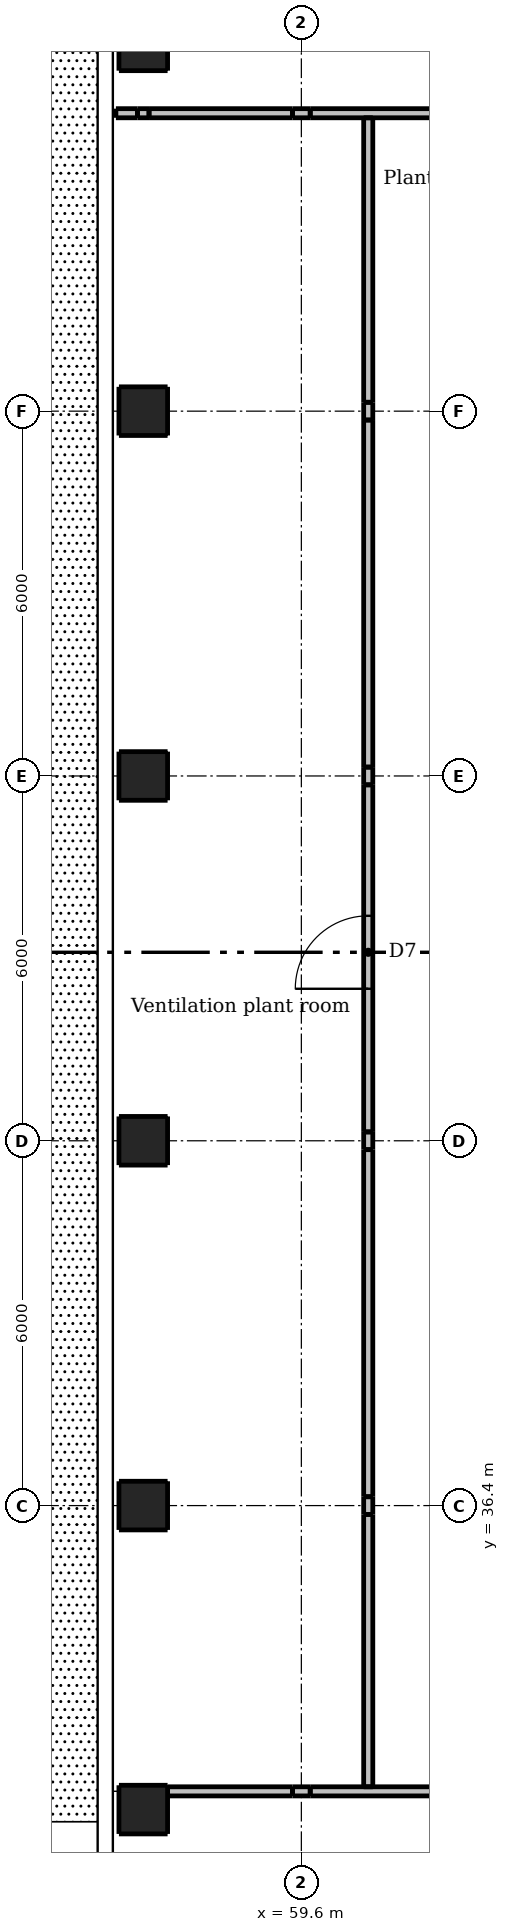
"""IFC4 building model, lengths in metres.
Left out: names, types, materials, properties, quantities, classifications, styles, units other than length and angle.
Written with IfcOpenShell. Run it as: python <this file> out.ifc"""

import sys

from ifc_helpers import new_model, si_unit, direction, frame, frame_2d, origin, origin_2d, place, context, subcontext, project, spatial, rectangle, extrude, element, fill, save


model = new_model("IFC4")
c1 = context("Model", 3, precision=1e-05, world=origin(), true_north=direction((0.0, 1.0)))
c2 = subcontext(c1, "Body", "Model", "MODEL_VIEW")
j1 = project(units=[si_unit("LENGTHUNIT", "METRE"), si_unit("PLANEANGLEUNIT", "RADIAN")], contexts=[c1])
p1 = place(None, origin())
s1 = spatial("IfcSite", under=j1, at=p1, CompositionType="ELEMENT")
p2 = place(p1, origin())
s2 = spatial("IfcBuilding", under=s1, at=p2, CompositionType="ELEMENT")
p3 = place(p2, frame((0.0, 0.0, 290.8)))
s3 = spatial("IfcBuildingStorey", under=s2, at=p3, CompositionType="ELEMENT", Elevation=290.8)
for number, where, z_axis, x_axis in (
    (1, (57.0, 31.4, 0.0), (0.0, 0.0, 1.0), (1.0, 0.0, 0.0)),
    (2, (57.0, 36.4, 0.0), (0.0, 0.0, 1.0), (1.0, 0.0, 0.0)),
    (3, (57.0, 42.4, 0.0), (0.0, 0.0, 1.0), (1.0, 0.0, 0.0)),
    (4, (57.0, 48.4, 0.0), (0.0, 0.0, 1.0), (1.0, 0.0, 0.0)),
    (5, (57.0, 54.4, 0.0), (0.0, 0.0, 1.0), (1.0, 0.0, 0.0)),
    (6, (57.0, 60.4, 0.0), (0.0, 0.0, 1.0), (1.0, 0.0, 0.0)),
):
    element("IfcColumn", number, at=place(p3, frame(where, z_axis=z_axis, x_axis=x_axis)), inside=s3, PredefinedType="COLUMN", context=c2, shape_type="SweptSolid", body=[
        extrude(rectangle(XDim=0.8, YDim=0.8, at=origin_2d()), origin(), (0.0, 0.0, 1.0), 3.3),
    ])
p4 = place(p3, frame((57.4, 31.7, 0.0), z_axis=(0.0, 0.0, 1.0), x_axis=(1.0, 0.0, 0.0)))
e7 = element("IfcWall", 7, at=p4, inside=s3, PredefinedType="PARTITIONING", context=c2, shape_type="SweptSolid", body=[
    extrude(rectangle(XDim=2.054, YDim=0.15, at=frame_2d((1.027, 0.0))), origin(), (0.0, 0.0, 1.0), 3.3),
])
p5 = place(p3, frame((59.454, 31.7, 0.0), z_axis=(0.0, 0.0, 1.0), x_axis=(1.0, 0.0, 0.0)))
e8 = element("IfcWall", 8, at=p5, inside=s3, PredefinedType="PARTITIONING", context=c2, shape_type="SweptSolid", body=[
    extrude(rectangle(XDim=0.292, YDim=0.15, at=frame_2d((0.146, 0.0))), origin(), (0.0, 0.0, 1.0), 2.462),
])
p6 = place(p3, frame((59.746, 31.7, 0.0), z_axis=(0.0, 0.0, 1.0), x_axis=(1.0, 0.0, 0.0)))
e9 = element("IfcWall", 9, at=p6, inside=s3, PredefinedType="PARTITIONING", context=c2, shape_type="SweptSolid", body=[
    extrude(rectangle(XDim=5.708, YDim=0.15, at=frame_2d((2.854, 0.0))), origin(), (0.0, 0.0, 1.0), 3.3),
])
p7 = place(p3, frame((56.55, 59.3, 0.0), z_axis=(0.0, 0.0, 1.0), x_axis=(1.0, 0.0, 0.0)))
e10 = element("IfcWall", 10, at=p7, inside=s3, PredefinedType="PARTITIONING", context=c2, shape_type="SweptSolid", body=[
    extrude(rectangle(XDim=0.355, YDim=0.15, at=frame_2d((0.177, 0.0))), origin(), (0.0, 0.0, 1.0), 3.3),
])
p8 = place(p3, frame((56.905, 59.3, 0.0), z_axis=(0.0, 0.0, 1.0), x_axis=(1.0, 0.0, 0.0)))
e11 = element("IfcWall", 11, at=p8, inside=s3, PredefinedType="PARTITIONING", context=c2, shape_type="SweptSolid", body=[
    extrude(rectangle(XDim=0.19, YDim=0.15, at=frame_2d((0.095, 0.0))), origin(), (0.0, 0.0, 1.0), 2.847),
])
p9 = place(p3, frame((57.095, 59.3, 0.0), z_axis=(0.0, 0.0, 1.0), x_axis=(1.0, 0.0, 0.0)))
e12 = element("IfcWall", 12, at=p9, inside=s3, PredefinedType="PARTITIONING", context=c2, shape_type="SweptSolid", body=[
    extrude(rectangle(XDim=2.359, YDim=0.15, at=frame_2d((1.18, 0.0))), origin(), (0.0, 0.0, 1.0), 3.3),
])
p10 = place(p3, frame((59.454, 59.3, 0.0), z_axis=(0.0, 0.0, 1.0), x_axis=(1.0, 0.0, 0.0)))
e13 = element("IfcWall", 13, at=p10, inside=s3, PredefinedType="PARTITIONING", context=c2, shape_type="SweptSolid", body=[
    extrude(rectangle(XDim=0.292, YDim=0.15, at=frame_2d((0.146, 0.0))), origin(), (0.0, 0.0, 1.0), 2.462),
])
p11 = place(p3, frame((59.746, 59.3, 0.0), z_axis=(0.0, 0.0, 1.0), x_axis=(1.0, 0.0, 0.0)))
e14 = element("IfcWall", 14, at=p11, inside=s3, PredefinedType="PARTITIONING", context=c2, shape_type="SweptSolid", body=[
    extrude(rectangle(XDim=5.708, YDim=0.15, at=frame_2d((2.854, 0.0))), origin(), (0.0, 0.0, 1.0), 3.3),
])
p12 = place(p3, frame((60.7, 31.775, 0.0), z_axis=(0.0, 0.0, 1.0), x_axis=(0.0, 1.0, 0.0)))
e15 = element("IfcWall", 15, at=p12, inside=s3, PredefinedType="PARTITIONING", context=c2, shape_type="SweptSolid", body=[
    extrude(rectangle(XDim=4.479, YDim=0.15, at=frame_2d((2.24, 0.0))), origin(), (0.0, 0.0, 1.0), 3.3),
])
p13 = place(p3, frame((60.7, 36.254, 0.0), z_axis=(0.0, 0.0, 1.0), x_axis=(0.0, 1.0, 0.0)))
e16 = element("IfcWall", 16, at=p13, inside=s3, PredefinedType="PARTITIONING", context=c2, shape_type="SweptSolid", body=[
    extrude(rectangle(XDim=0.292, YDim=0.15, at=frame_2d((0.146, 0.0))), origin(), (0.0, 0.0, 1.0), 2.459),
])
p14 = place(p3, frame((60.7, 36.546, 0.0), z_axis=(0.0, 0.0, 1.0), x_axis=(0.0, 1.0, 0.0)))
e17 = element("IfcWall", 17, at=p14, inside=s3, PredefinedType="PARTITIONING", context=c2, shape_type="SweptSolid", body=[
    extrude(rectangle(XDim=5.708, YDim=0.15, at=frame_2d((2.854, 0.0))), origin(), (0.0, 0.0, 1.0), 3.3),
])
p15 = place(p3, frame((60.7, 42.254, 0.0), z_axis=(0.0, 0.0, 1.0), x_axis=(0.0, 1.0, 0.0)))
e18 = element("IfcWall", 18, at=p15, inside=s3, PredefinedType="PARTITIONING", context=c2, shape_type="SweptSolid", body=[
    extrude(rectangle(XDim=0.292, YDim=0.15, at=frame_2d((0.146, 0.0))), origin(), (0.0, 0.0, 1.0), 2.465),
])
p16 = place(p3, frame((60.7, 42.546, 0.0), z_axis=(0.0, 0.0, 1.0), x_axis=(0.0, 1.0, 0.0)))
e19 = element("IfcWall", 19, at=p16, inside=s3, PredefinedType="PARTITIONING", context=c2, shape_type="SweptSolid", body=[
    extrude(rectangle(XDim=5.708, YDim=0.15, at=frame_2d((2.854, 0.0))), origin(), (0.0, 0.0, 1.0), 3.3),
])
p17 = place(p16, frame((2.354, 0.0, 0.0)))
e20 = element("IfcOpeningElement", 20, at=p17, cuts=e19, PredefinedType="OPENING", context=c2, shape_type="SweptSolid", body=[
    extrude(rectangle(XDim=1.2, YDim=2.1, at=frame_2d((0.6, 1.05))), frame((0.0, 0.085, 0.0), z_axis=(0.0, -1.0, 0.0), x_axis=(1.0, 0.0, 0.0)), (0.0, 0.0, 1.0), 0.17),
])
p18 = place(p3, frame((60.7, 48.254, 0.0), z_axis=(0.0, 0.0, 1.0), x_axis=(0.0, 1.0, 0.0)))
e21 = element("IfcWall", 21, at=p18, inside=s3, PredefinedType="PARTITIONING", context=c2, shape_type="SweptSolid", body=[
    extrude(rectangle(XDim=0.292, YDim=0.15, at=frame_2d((0.146, 0.0))), origin(), (0.0, 0.0, 1.0), 2.465),
])
p19 = place(p3, frame((60.7, 48.546, 0.0), z_axis=(0.0, 0.0, 1.0), x_axis=(0.0, 1.0, 0.0)))
e22 = element("IfcWall", 22, at=p19, inside=s3, PredefinedType="PARTITIONING", context=c2, shape_type="SweptSolid", body=[
    extrude(rectangle(XDim=5.708, YDim=0.15, at=frame_2d((2.854, 0.0))), origin(), (0.0, 0.0, 1.0), 3.3),
])
p20 = place(p3, frame((60.7, 54.254, 0.0), z_axis=(0.0, 0.0, 1.0), x_axis=(0.0, 1.0, 0.0)))
e23 = element("IfcWall", 23, at=p20, inside=s3, PredefinedType="PARTITIONING", context=c2, shape_type="SweptSolid", body=[
    extrude(rectangle(XDim=0.292, YDim=0.15, at=frame_2d((0.146, 0.0))), origin(), (0.0, 0.0, 1.0), 2.459),
])
p21 = place(p3, frame((60.7, 54.546, 0.0), z_axis=(0.0, 0.0, 1.0), x_axis=(0.0, 1.0, 0.0)))
e24 = element("IfcWall", 24, at=p21, inside=s3, PredefinedType="PARTITIONING", context=c2, shape_type="SweptSolid", body=[
    extrude(rectangle(XDim=4.679, YDim=0.15, at=frame_2d((2.34, 0.0))), origin(), (0.0, 0.0, 1.0), 3.3),
])
p22 = place(p17, origin())
e25 = element("IfcDoor", 25, at=p22, inside=s3, OperationType="SINGLE_SWING_LEFT", PredefinedType="DOOR", context=c2, shape_type="SweptSolid", body=[
    extrude(rectangle(XDim=1.2, YDim=2.1, at=frame_2d((0.6, 1.05))), frame((0.0, 0.025, 0.0), z_axis=(0.0, -1.0, 0.0), x_axis=(1.0, 0.0, 0.0)), (0.0, 0.0, 1.0), 0.05),
])
fill(e20, e25)
save(model, sys.argv[1])
